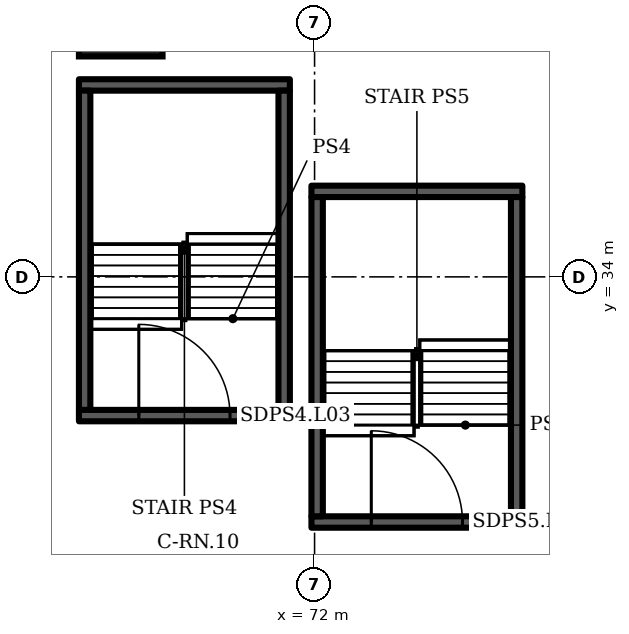
"""IFC4 building model, lengths in metres.
Left out: names, types, materials, properties, quantities, classifications, styles, units other than length and angle.
Written with IfcOpenShell. Run it as: python <this file> out.ifc"""

import sys

from ifc_helpers import new_model, si_unit, direction, frame, frame_2d, origin, origin_2d, place, context, subcontext, project, spatial, rectangle, extrude, element, fill, save


model = new_model("IFC4")
c1 = context("Model", 3, precision=1e-05, world=origin(), true_north=direction((0.0, 1.0)))
c2 = subcontext(c1, "Body", "Model", "MODEL_VIEW")
j1 = project(units=[si_unit("LENGTHUNIT", "METRE"), si_unit("PLANEANGLEUNIT", "RADIAN")], contexts=[c1])
p1 = place(None, origin())
s1 = spatial("IfcSite", under=j1, at=p1, CompositionType="ELEMENT")
p2 = place(p1, origin())
s2 = spatial("IfcBuilding", under=s1, at=p2, CompositionType="ELEMENT")
p3 = place(p2, frame((0.0, 0.0, 21.5)))
s3 = spatial("IfcBuildingStorey", under=s2, at=p3, CompositionType="ELEMENT", Elevation=21.5)
p4 = place(p3, frame((66.9, 40.9, 0.0), z_axis=(0.0, 0.0, 1.0), x_axis=(1.0, 0.0, 0.0)))
e1 = element("IfcColumn", 1, at=p4, inside=s3, PredefinedType="COLUMN", context=c2, shape_type="SweptSolid", body=[
    extrude(rectangle(XDim=2.2, YDim=2.2, at=origin_2d()), origin(), (0.0, 0.0, 1.0), 6.0),
])
p5 = place(p3, frame((65.8, 30.35, 0.0), z_axis=(0.0, 0.0, 1.0), x_axis=(1.0, 0.0, 0.0)))
e2 = element("IfcWall", 2, at=p5, inside=s3, PredefinedType="SHEAR", context=c2, shape_type="SweptSolid", body=[
    extrude(rectangle(XDim=5.55, YDim=0.3, at=frame_2d((2.775, 0.0))), origin(), (0.0, 0.0, 1.0), 5.7),
])
p6 = place(p5, frame((1.575, 0.0, 0.0)))
e3 = element("IfcOpeningElement", 3, at=p6, cuts=e2, PredefinedType="OPENING", context=c2, shape_type="SweptSolid", body=[
    extrude(rectangle(XDim=2.4, YDim=2.1, at=frame_2d((1.2, 1.05))), frame((0.0, 0.16, 0.0), z_axis=(0.0, -1.0, 0.0), x_axis=(1.0, 0.0, 0.0)), (0.0, 0.0, 1.0), 0.32),
])
p7 = place(p3, frame((65.8, 39.05, 0.0), z_axis=(0.0, 0.0, 1.0), x_axis=(1.0, 0.0, 0.0)))
e4 = element("IfcWall", 4, at=p7, inside=s3, PredefinedType="SHEAR", context=c2, shape_type="SweptSolid", body=[
    extrude(rectangle(XDim=5.55, YDim=0.3, at=frame_2d((2.775, 0.0))), origin(), (0.0, 0.0, 1.0), 5.7),
])
for number, where, z_axis, x_axis in (
    (5, (65.95, 30.5, 0.0), (0.0, 0.0, 1.0), (0.0, 1.0, 0.0)),
    (6, (71.2, 30.5, 0.0), (0.0, 0.0, 1.0), (0.0, 1.0, 0.0)),
):
    element("IfcWall", number, at=place(p3, frame(where, z_axis=z_axis, x_axis=x_axis)), inside=s3, PredefinedType="SHEAR", context=c2, shape_type="SweptSolid", body=[
        extrude(rectangle(XDim=8.4, YDim=0.3, at=frame_2d((4.2, 0.0))), origin(), (0.0, 0.0, 1.0), 5.7),
    ])
p8 = place(p3, frame((71.917, 27.55, 0.0), z_axis=(0.0, 0.0, 1.0), x_axis=(1.0, 0.0, 0.0)))
e7 = element("IfcWall", 7, at=p8, inside=s3, PredefinedType="SHEAR", context=c2, shape_type="SweptSolid", body=[
    extrude(rectangle(XDim=5.55, YDim=0.3, at=frame_2d((2.775, 0.0))), origin(), (0.0, 0.0, 1.0), 5.7),
])
p9 = place(p8, frame((1.575, 0.0, 0.0)))
e8 = element("IfcOpeningElement", 8, at=p9, cuts=e7, PredefinedType="OPENING", context=c2, shape_type="SweptSolid", body=[
    extrude(rectangle(XDim=2.4, YDim=2.1, at=frame_2d((1.2, 1.05))), frame((0.0, 0.16, 0.0), z_axis=(0.0, -1.0, 0.0), x_axis=(1.0, 0.0, 0.0)), (0.0, 0.0, 1.0), 0.32),
])
p10 = place(p3, frame((71.917, 36.25, 0.0), z_axis=(0.0, 0.0, 1.0), x_axis=(1.0, 0.0, 0.0)))
e9 = element("IfcWall", 9, at=p10, inside=s3, PredefinedType="SHEAR", context=c2, shape_type="SweptSolid", body=[
    extrude(rectangle(XDim=5.55, YDim=0.3, at=frame_2d((2.775, 0.0))), origin(), (0.0, 0.0, 1.0), 5.7),
])
for number, where, z_axis, x_axis in (
    (10, (72.067, 27.7, 0.0), (0.0, 0.0, 1.0), (0.0, 1.0, 0.0)),
    (11, (77.317, 27.7, 0.0), (0.0, 0.0, 1.0), (0.0, 1.0, 0.0)),
):
    element("IfcWall", number, at=place(p3, frame(where, z_axis=z_axis, x_axis=x_axis)), inside=s3, PredefinedType="SHEAR", context=c2, shape_type="SweptSolid", body=[
        extrude(rectangle(XDim=8.4, YDim=0.3, at=frame_2d((4.2, 0.0))), origin(), (0.0, 0.0, 1.0), 5.7),
    ])
p11 = place(p6, origin())
e12 = element("IfcDoor", 12, at=p11, inside=s3, OperationType="DOUBLE_DOOR_SINGLE_SWING", PredefinedType="DOOR", context=c2, shape_type="SweptSolid", body=[
    extrude(rectangle(XDim=2.4, YDim=2.1, at=frame_2d((1.2, 1.05))), frame((0.0, 0.025, 0.0), z_axis=(0.0, -1.0, 0.0), x_axis=(1.0, 0.0, 0.0)), (0.0, 0.0, 1.0), 0.05),
])
fill(e3, e12)
p12 = place(p9, origin())
e13 = element("IfcDoor", 13, at=p12, inside=s3, OperationType="DOUBLE_DOOR_SINGLE_SWING", PredefinedType="DOOR", context=c2, shape_type="SweptSolid", body=[
    extrude(rectangle(XDim=2.4, YDim=2.1, at=frame_2d((1.2, 1.05))), frame((0.0, 0.025, 0.0), z_axis=(0.0, -1.0, 0.0), x_axis=(1.0, 0.0, 0.0)), (0.0, 0.0, 1.0), 0.05),
])
fill(e8, e13)
save(model, sys.argv[1])
